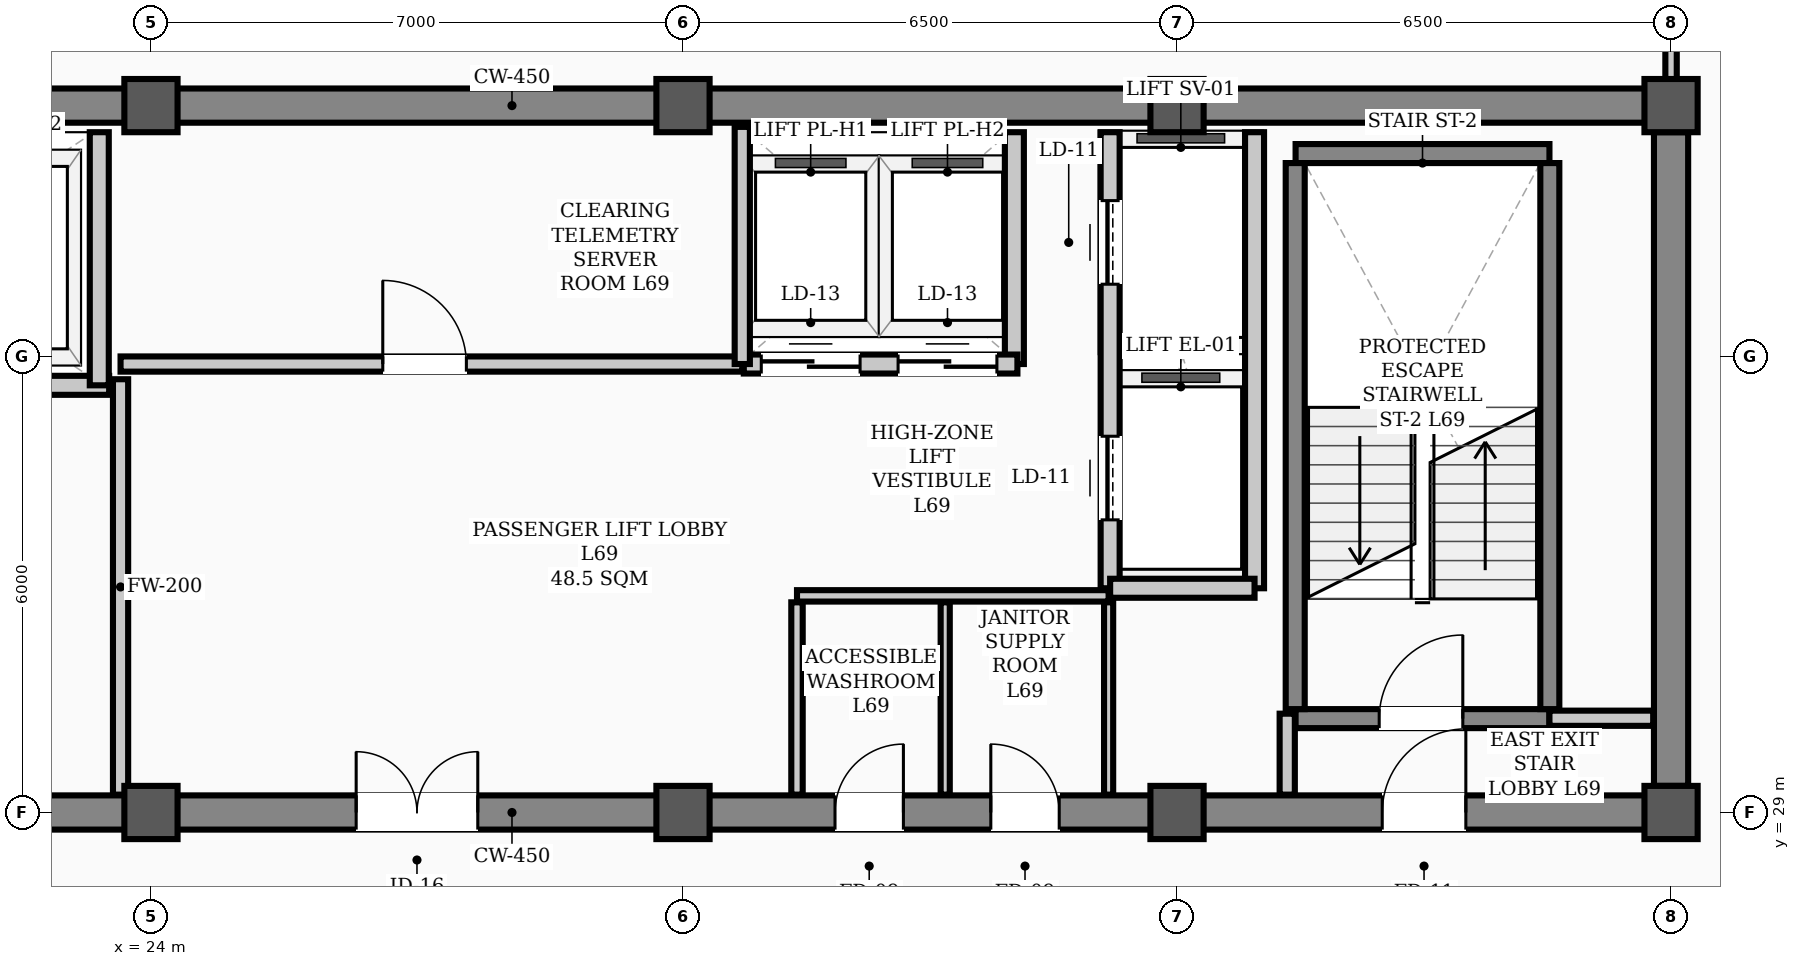
"""IFC4 building model, lengths in metres.
Left out: names, types, materials, properties, quantities, classifications, styles, units other than length and angle.
Written with IfcOpenShell. Run it as: python <this file> out.ifc"""

import sys

from ifc_helpers import new_model, si_unit, direction, frame, frame_2d, origin, origin_2d, place, context, subcontext, project, spatial, rectangle, hollow_rectangle, extrude, element, fill, save


model = new_model("IFC4")
c1 = context("Model", 3, precision=1e-05, world=origin(), true_north=direction((0.0, 1.0)))
c2 = subcontext(c1, "Body", "Model", "MODEL_VIEW")
j1 = project(units=[si_unit("LENGTHUNIT", "METRE"), si_unit("PLANEANGLEUNIT", "RADIAN")], contexts=[c1])
p1 = place(None, origin())
s1 = spatial("IfcSite", under=j1, at=p1, CompositionType="ELEMENT")
p2 = place(p1, origin())
s2 = spatial("IfcBuilding", under=s1, at=p2, CompositionType="ELEMENT")
p3 = place(p2, frame((0.0, 0.0, 277.4)))
s3 = spatial("IfcBuildingStorey", under=s2, at=p3, CompositionType="ELEMENT", Elevation=277.4)
for number, where, z_axis, x_axis in (
    (1, (24.0, 29.0, 0.0), (0.0, 0.0, 1.0), (1.0, 0.0, 0.0)),
    (2, (24.0, 38.3, 0.0), (0.0, 0.0, 1.0), (1.0, 0.0, 0.0)),
    (3, (31.0, 29.0, 0.0), (0.0, 0.0, 1.0), (1.0, 0.0, 0.0)),
    (4, (31.0, 38.3, 0.0), (0.0, 0.0, 1.0), (1.0, 0.0, 0.0)),
    (5, (37.5, 29.0, 0.0), (0.0, 0.0, 1.0), (1.0, 0.0, 0.0)),
    (6, (37.5, 38.3, 0.0), (0.0, 0.0, 1.0), (1.0, 0.0, 0.0)),
    (7, (44.0, 29.0, 0.0), (0.0, 0.0, 1.0), (1.0, 0.0, 0.0)),
    (8, (44.0, 38.3, 0.0), (0.0, 0.0, 1.0), (1.0, 0.0, 0.0)),
):
    element("IfcColumn", number, at=place(p3, frame(where, z_axis=z_axis, x_axis=x_axis)), inside=s3, PredefinedType="COLUMN", context=c2, shape_type="SweptSolid", body=[
        extrude(hollow_rectangle(XDim=0.7, YDim=0.7, WallThickness=0.028, InnerFilletRadius=0.014, OuterFilletRadius=0.042, at=origin_2d()), origin(), (0.0, 0.0, 1.0), 3.9),
    ])
p4 = place(p3, frame((13.5, 29.0, 0.0), z_axis=(0.0, 0.0, 1.0), x_axis=(1.0, 0.0, 0.0)))
e9 = element("IfcWall", 9, at=p4, inside=s3, PredefinedType="SHEAR", context=c2, shape_type="SweptSolid", body=[
    extrude(rectangle(XDim=30.5, YDim=0.45, at=frame_2d((15.25, 0.0))), origin(), (0.0, 0.0, 1.0), 3.66),
])
p5 = place(p4, frame((1.75, 0.0, 0.0)))
e10 = element("IfcOpeningElement", 10, at=p5, cuts=e9, PredefinedType="OPENING", context=c2, shape_type="SweptSolid", body=[
    extrude(rectangle(XDim=1.1, YDim=2.08, at=frame_2d((0.55, 1.04))), frame((0.0, 0.235, 0.0), z_axis=(0.0, -1.0, 0.0), x_axis=(1.0, 0.0, 0.0)), (0.0, 0.0, 1.0), 0.47),
])
p6 = place(p4, frame((26.7, 0.0, 0.0)))
e11 = element("IfcOpeningElement", 11, at=p6, cuts=e9, PredefinedType="OPENING", context=c2, shape_type="SweptSolid", body=[
    extrude(rectangle(XDim=1.1, YDim=2.08, at=frame_2d((0.55, 1.04))), frame((0.0, 0.235, 0.0), z_axis=(0.0, -1.0, 0.0), x_axis=(1.0, 0.0, 0.0)), (0.0, 0.0, 1.0), 0.47),
])
p7 = place(p4, frame((6.8, 0.0, 0.0)))
e12 = element("IfcOpeningElement", 12, at=p7, cuts=e9, PredefinedType="OPENING", context=c2, shape_type="SweptSolid", body=[
    extrude(rectangle(XDim=1.1, YDim=2.08, at=frame_2d((0.55, 1.04))), frame((0.0, 0.235, 0.0), z_axis=(0.0, -1.0, 0.0), x_axis=(1.0, 0.0, 0.0)), (0.0, 0.0, 1.0), 0.47),
])
p8 = place(p4, frame((13.2, 0.0, 0.0)))
e13 = element("IfcOpeningElement", 13, at=p8, cuts=e9, PredefinedType="OPENING", context=c2, shape_type="SweptSolid", body=[
    extrude(rectangle(XDim=1.6, YDim=2.08, at=frame_2d((0.8, 1.04))), frame((0.0, 0.235, 0.0), z_axis=(0.0, -1.0, 0.0), x_axis=(1.0, 0.0, 0.0)), (0.0, 0.0, 1.0), 0.47),
])
p9 = place(p4, frame((19.5, 0.0, 0.0)))
e14 = element("IfcOpeningElement", 14, at=p9, cuts=e9, PredefinedType="OPENING", context=c2, shape_type="SweptSolid", body=[
    extrude(rectangle(XDim=0.9, YDim=2.08, at=frame_2d((0.45, 1.04))), frame((0.0, 0.235, 0.0), z_axis=(0.0, -1.0, 0.0), x_axis=(1.0, 0.0, 0.0)), (0.0, 0.0, 1.0), 0.47),
])
p10 = place(p4, frame((21.55, 0.0, 0.0)))
e15 = element("IfcOpeningElement", 15, at=p10, cuts=e9, PredefinedType="OPENING", context=c2, shape_type="SweptSolid", body=[
    extrude(rectangle(XDim=0.9, YDim=2.08, at=frame_2d((0.45, 1.04))), frame((0.0, 0.235, 0.0), z_axis=(0.0, -1.0, 0.0), x_axis=(1.0, 0.0, 0.0)), (0.0, 0.0, 1.0), 0.47),
])
p11 = place(p3, frame((13.5, 38.3, 0.0), z_axis=(0.0, 0.0, 1.0), x_axis=(1.0, 0.0, 0.0)))
e16 = element("IfcWall", 16, at=p11, inside=s3, PredefinedType="SHEAR", context=c2, shape_type="SweptSolid", body=[
    extrude(rectangle(XDim=30.5, YDim=0.45, at=frame_2d((15.25, 0.0))), origin(), (0.0, 0.0, 1.0), 3.66),
])
p12 = place(p3, frame((44.0, 29.35, 0.0), z_axis=(0.0, 0.0, 1.0), x_axis=(0.0, 1.0, 0.0)))
e17 = element("IfcWall", 17, at=p12, inside=s3, PredefinedType="SHEAR", context=c2, shape_type="SweptSolid", body=[
    extrude(rectangle(XDim=8.6, YDim=0.45, at=frame_2d((4.3, 0.0))), origin(), (0.0, 0.0, 1.0), 3.66),
])
p13 = place(p3, frame((39.06, 30.235, 0.0), z_axis=(0.0, 0.0, 1.0), x_axis=(1.0, 0.0, 0.0)))
e18 = element("IfcWall", 18, at=p13, inside=s3, PredefinedType="STANDARD", context=c2, shape_type="SweptSolid", body=[
    extrude(rectangle(XDim=3.34, YDim=0.25, at=frame_2d((1.67, 0.0))), origin(), (0.0, 0.0, 1.0), 3.66),
])
p14 = place(p13, frame((1.1, 0.0, 0.0)))
e19 = element("IfcOpeningElement", 19, at=p14, cuts=e18, PredefinedType="OPENING", context=c2, shape_type="SweptSolid", body=[
    extrude(rectangle(XDim=1.1, YDim=2.08, at=frame_2d((0.55, 1.04))), frame((0.0, 0.135, 0.0), z_axis=(0.0, -1.0, 0.0), x_axis=(1.0, 0.0, 0.0)), (0.0, 0.0, 1.0), 0.27),
])
p15 = place(p3, frame((39.06, 37.669, 0.0), z_axis=(0.0, 0.0, 1.0), x_axis=(1.0, 0.0, 0.0)))
e20 = element("IfcWall", 20, at=p15, inside=s3, PredefinedType="STANDARD", context=c2, shape_type="SweptSolid", body=[
    extrude(rectangle(XDim=3.34, YDim=0.25, at=frame_2d((1.67, 0.0))), origin(), (0.0, 0.0, 1.0), 3.66),
])
for number, where, z_axis, x_axis in (
    (21, (39.055, 30.36, 0.0), (0.0, 0.0, 1.0), (0.0, 1.0, 0.0)),
    (22, (42.405, 30.36, 0.0), (0.0, 0.0, 1.0), (0.0, 1.0, 0.0)),
):
    element("IfcWall", number, at=place(p3, frame(where, z_axis=z_axis, x_axis=x_axis)), inside=s3, PredefinedType="STANDARD", context=c2, shape_type="SweptSolid", body=[
        extrude(rectangle(XDim=7.184, YDim=0.25, at=frame_2d((3.592, 0.0))), origin(), (0.0, 0.0, 1.0), 3.66),
    ])
p16 = place(p3, frame((18.1, 34.62, 0.0), z_axis=(0.0, 0.0, 1.0), x_axis=(1.0, 0.0, 0.0)))
e23 = element("IfcWall", 23, at=p16, inside=s3, PredefinedType="STANDARD", context=c2, shape_type="SweptSolid", body=[
    extrude(rectangle(XDim=5.35, YDim=0.25, at=frame_2d((2.675, 0.0))), origin(), (0.0, 0.0, 1.0), 3.66),
])
p17 = place(p16, frame((0.85, 0.0, 0.0)))
e24 = element("IfcOpeningElement", 24, at=p17, cuts=e23, PredefinedType="OPENING", context=c2, shape_type="SweptSolid", body=[
    extrude(rectangle(XDim=1.1, YDim=2.08, at=frame_2d((0.55, 1.04))), frame((0.0, 0.135, 0.0), z_axis=(0.0, -1.0, 0.0), x_axis=(1.0, 0.0, 0.0)), (0.0, 0.0, 1.0), 0.27),
])
p18 = place(p16, frame((3.45, 0.0, 0.0)))
e25 = element("IfcOpeningElement", 25, at=p18, cuts=e23, PredefinedType="OPENING", context=c2, shape_type="SweptSolid", body=[
    extrude(rectangle(XDim=1.1, YDim=2.08, at=frame_2d((0.55, 1.04))), frame((0.0, 0.135, 0.0), z_axis=(0.0, -1.0, 0.0), x_axis=(1.0, 0.0, 0.0)), (0.0, 0.0, 1.0), 0.27),
])
p19 = place(p3, frame((36.62, 31.95, 0.0), z_axis=(0.0, 0.0, 1.0), x_axis=(0.0, 1.0, 0.0)))
e26 = element("IfcWall", 26, at=p19, inside=s3, PredefinedType="STANDARD", context=c2, shape_type="SweptSolid", body=[
    extrude(rectangle(XDim=6.0, YDim=0.25, at=frame_2d((3.0, 0.0))), origin(), (0.0, 0.0, 1.0), 2.24),
])
p20 = place(p19, frame((0.9, 0.0, 0.0)))
e27 = element("IfcOpeningElement", 27, at=p20, cuts=e26, PredefinedType="OPENING", context=c2, shape_type="SweptSolid", body=[
    extrude(rectangle(XDim=1.1, YDim=2.08, at=frame_2d((0.55, 1.04))), frame((0.0, 0.135, 0.0), z_axis=(0.0, -1.0, 0.0), x_axis=(1.0, 0.0, 0.0)), (0.0, 0.0, 1.0), 0.27),
])
p21 = place(p19, frame((4.0, 0.0, 0.0)))
e28 = element("IfcOpeningElement", 28, at=p21, cuts=e26, PredefinedType="OPENING", context=c2, shape_type="SweptSolid", body=[
    extrude(rectangle(XDim=1.1, YDim=2.08, at=frame_2d((0.55, 1.04))), frame((0.0, 0.135, 0.0), z_axis=(0.0, -1.0, 0.0), x_axis=(1.0, 0.0, 0.0)), (0.0, 0.0, 1.0), 0.27),
])
p22 = place(p3, frame((38.52, 31.95, 0.0), z_axis=(0.0, 0.0, 1.0), x_axis=(0.0, 1.0, 0.0)))
e29 = element("IfcWall", 29, at=p22, inside=s3, PredefinedType="STANDARD", context=c2, shape_type="SweptSolid", body=[
    extrude(rectangle(XDim=6.0, YDim=0.25, at=frame_2d((3.0, 0.0))), origin(), (0.0, 0.0, 1.0), 2.24),
])
p23 = place(p3, frame((36.62, 31.95, 0.0), z_axis=(0.0, 0.0, 1.0), x_axis=(1.0, 0.0, 0.0)))
e30 = element("IfcWall", 30, at=p23, inside=s3, PredefinedType="STANDARD", context=c2, shape_type="SweptSolid", body=[
    extrude(rectangle(XDim=1.9, YDim=0.25, at=frame_2d((0.95, 0.0))), origin(), (0.0, 0.0, 1.0), 3.48),
])
p24 = place(p3, frame((23.32, 34.62, 0.0), z_axis=(0.0, 0.0, 1.0), x_axis=(0.0, 1.0, 0.0)))
e31 = element("IfcWall", 31, at=p24, inside=s3, PredefinedType="STANDARD", context=c2, shape_type="SweptSolid", body=[
    extrude(rectangle(XDim=3.33, YDim=0.25, at=frame_2d((1.665, 0.0))), origin(), (0.0, 0.0, 1.0), 3.66),
])
p25 = place(p3, frame((35.36, 34.9, 0.0), z_axis=(0.0, 0.0, 1.0), x_axis=(0.0, 1.0, 0.0)))
e32 = element("IfcWall", 32, at=p25, inside=s3, PredefinedType="STANDARD", context=c2, shape_type="SweptSolid", body=[
    extrude(rectangle(XDim=3.05, YDim=0.25, at=frame_2d((1.525, 0.0))), origin(), (0.0, 0.0, 1.0), 2.24),
])
p26 = place(p3, frame((31.8, 34.9, 0.0), z_axis=(0.0, 0.0, 1.0), x_axis=(1.0, 0.0, 0.0)))
e33 = element("IfcWall", 33, at=p26, inside=s3, PredefinedType="STANDARD", context=c2, shape_type="SweptSolid", body=[
    extrude(rectangle(XDim=3.6, YDim=0.25, at=frame_2d((1.8, 0.0))), origin(), (0.0, 0.0, 1.0), 3.66),
])
p27 = place(p26, frame((0.23, 0.0, 0.0)))
e34 = element("IfcOpeningElement", 34, at=p27, cuts=e33, PredefinedType="OPENING", context=c2, shape_type="SweptSolid", body=[
    extrude(rectangle(XDim=1.3, YDim=2.08, at=frame_2d((0.65, 1.04))), frame((0.0, 0.135, 0.0), z_axis=(0.0, -1.0, 0.0), x_axis=(1.0, 0.0, 0.0)), (0.0, 0.0, 1.0), 0.27),
])
p28 = place(p26, frame((2.03, 0.0, 0.0)))
e35 = element("IfcOpeningElement", 35, at=p28, cuts=e33, PredefinedType="OPENING", context=c2, shape_type="SweptSolid", body=[
    extrude(rectangle(XDim=1.3, YDim=2.08, at=frame_2d((0.65, 1.04))), frame((0.0, 0.135, 0.0), z_axis=(0.0, -1.0, 0.0), x_axis=(1.0, 0.0, 0.0)), (0.0, 0.0, 1.0), 0.27),
])
p29 = place(p3, frame((42.4, 30.24, 0.0), z_axis=(0.0, 0.0, 1.0), x_axis=(1.0, 0.0, 0.0)))
e36 = element("IfcWall", 36, at=p29, inside=s3, PredefinedType="STANDARD", context=c2, shape_type="SweptSolid", body=[
    extrude(rectangle(XDim=1.365, YDim=0.2, at=frame_2d((0.683, 0.0))), origin(), (0.0, 0.0, 1.0), 2.24),
])
p30 = place(p3, frame((23.6, 34.9, 0.0), z_axis=(0.0, 0.0, 1.0), x_axis=(1.0, 0.0, 0.0)))
e37 = element("IfcWall", 37, at=p30, inside=s3, PredefinedType="STANDARD", context=c2, shape_type="SweptSolid", body=[
    extrude(rectangle(XDim=8.18, YDim=0.2, at=frame_2d((4.09, 0.0))), origin(), (0.0, 0.0, 1.0), 3.66),
])
p31 = place(p30, frame((3.45, 0.0, 0.0)))
e38 = element("IfcOpeningElement", 38, at=p31, cuts=e37, PredefinedType="OPENING", context=c2, shape_type="SweptSolid", body=[
    extrude(rectangle(XDim=1.1, YDim=2.08, at=frame_2d((0.55, 1.04))), frame((0.0, 0.11, 0.0), z_axis=(0.0, -1.0, 0.0), x_axis=(1.0, 0.0, 0.0)), (0.0, 0.0, 1.0), 0.22),
])
p32 = place(p3, frame((32.5, 31.85, 0.0), z_axis=(0.0, 0.0, 1.0), x_axis=(1.0, 0.0, 0.0)))
e39 = element("IfcWall", 39, at=p32, inside=s3, PredefinedType="PARTITIONING", context=c2, shape_type="SweptSolid", body=[
    extrude(rectangle(XDim=4.1, YDim=0.15, at=frame_2d((2.05, 0.0))), origin(), (0.0, 0.0, 1.0), 3.66),
])
p33 = place(p3, frame((38.95, 29.235, 0.0), z_axis=(0.0, 0.0, 1.0), x_axis=(0.0, 1.0, 0.0)))
e40 = element("IfcWall", 40, at=p33, inside=s3, PredefinedType="STANDARD", context=c2, shape_type="SweptSolid", body=[
    extrude(rectangle(XDim=1.065, YDim=0.2, at=frame_2d((0.532, 0.0))), origin(), (0.0, 0.0, 1.0), 2.24),
])
p34 = place(p3, frame((23.6, 29.235, 0.0), z_axis=(0.0, 0.0, 1.0), x_axis=(0.0, 1.0, 0.0)))
e41 = element("IfcWall", 41, at=p34, inside=s3, PredefinedType="STANDARD", context=c2, shape_type="SweptSolid", body=[
    extrude(rectangle(XDim=5.465, YDim=0.2, at=frame_2d((2.732, 0.0))), origin(), (0.0, 0.0, 1.0), 2.24),
])
p35 = place(p3, frame((32.5, 29.235, 0.0), z_axis=(0.0, 0.0, 1.0), x_axis=(0.0, 1.0, 0.0)))
e42 = element("IfcWall", 42, at=p35, inside=s3, PredefinedType="PARTITIONING", context=c2, shape_type="SweptSolid", body=[
    extrude(rectangle(XDim=2.53, YDim=0.15, at=frame_2d((1.265, 0.0))), origin(), (0.0, 0.0, 1.0), 2.24),
])
for number, where, z_axis, x_axis in (
    (43, (36.6, 29.235, 0.0), (0.0, 0.0, 1.0), (0.0, 1.0, 0.0)),
    (44, (34.45, 29.235, 0.0), (0.0, 0.0, 1.0), (0.0, 1.0, 0.0)),
):
    element("IfcWall", number, at=place(p3, frame(where, z_axis=z_axis, x_axis=x_axis)), inside=s3, PredefinedType="PARTITIONING", context=c2, shape_type="SweptSolid", body=[
        extrude(rectangle(XDim=2.53, YDim=0.12, at=frame_2d((1.265, 0.0))), origin(), (0.0, 0.0, 1.0), 2.24),
    ])
p36 = place(p3, frame((44.0, 38.535, 0.0), z_axis=(0.0, 0.0, 1.0), x_axis=(0.0, 1.0, 0.0)))
e45 = element("IfcWall", 45, at=p36, inside=s3, PredefinedType="PARTITIONING", context=c2, shape_type="SweptSolid", body=[
    extrude(rectangle(XDim=3.205, YDim=0.15, at=frame_2d((1.603, 0.0))), origin(), (0.0, 0.0, 1.0), 2.24),
])
p37 = place(p3, frame((31.78, 34.9, 0.0), z_axis=(0.0, 0.0, 1.0), x_axis=(0.0, 1.0, 0.0)))
e46 = element("IfcWall", 46, at=p37, inside=s3, PredefinedType="STANDARD", context=c2, shape_type="SweptSolid", body=[
    extrude(rectangle(XDim=3.12, YDim=0.2, at=frame_2d((1.56, 0.0))), origin(), (0.0, 0.0, 1.0), 2.24),
])
p38 = place(p14, origin())
e47 = element("IfcDoor", 47, at=p38, inside=s3, OperationType="SINGLE_SWING_RIGHT", PredefinedType="DOOR", context=c2, shape_type="SweptSolid", body=[
    extrude(rectangle(XDim=1.1, YDim=2.08, at=frame_2d((0.55, 1.04))), frame((0.0, 0.025, 0.0), z_axis=(0.0, -1.0, 0.0), x_axis=(1.0, 0.0, 0.0)), (0.0, 0.0, 1.0), 0.05),
])
fill(e19, e47)
p39 = place(p6, origin())
e48 = element("IfcDoor", 48, at=p39, inside=s3, OperationType="SINGLE_SWING_RIGHT", PredefinedType="DOOR", context=c2, shape_type="SweptSolid", body=[
    extrude(rectangle(XDim=1.1, YDim=2.08, at=frame_2d((0.55, 1.04))), frame((0.0, 0.025, 0.0), z_axis=(0.0, -1.0, 0.0), x_axis=(1.0, 0.0, 0.0)), (0.0, 0.0, 1.0), 0.05),
])
fill(e11, e48)
p40 = place(p8, origin())
e49 = element("IfcDoor", 49, at=p40, inside=s3, OperationType="DOUBLE_DOOR_SINGLE_SWING", PredefinedType="DOOR", context=c2, shape_type="SweptSolid", body=[
    extrude(rectangle(XDim=1.6, YDim=2.08, at=frame_2d((0.8, 1.04))), frame((0.0, 0.025, 0.0), z_axis=(0.0, -1.0, 0.0), x_axis=(1.0, 0.0, 0.0)), (0.0, 0.0, 1.0), 0.05),
])
fill(e13, e49)
p41 = place(p31, origin())
e50 = element("IfcDoor", 50, at=p41, inside=s3, OperationType="SINGLE_SWING_LEFT", PredefinedType="DOOR", context=c2, shape_type="SweptSolid", body=[
    extrude(rectangle(XDim=1.1, YDim=2.08, at=frame_2d((0.55, 1.04))), frame((0.0, 0.025, 0.0), z_axis=(0.0, -1.0, 0.0), x_axis=(1.0, 0.0, 0.0)), (0.0, 0.0, 1.0), 0.05),
])
fill(e38, e50)
p42 = place(p9, origin())
e51 = element("IfcDoor", 51, at=p42, inside=s3, OperationType="SINGLE_SWING_RIGHT", PredefinedType="DOOR", context=c2, shape_type="SweptSolid", body=[
    extrude(rectangle(XDim=0.9, YDim=2.08, at=frame_2d((0.45, 1.04))), frame((0.0, 0.025, 0.0), z_axis=(0.0, -1.0, 0.0), x_axis=(1.0, 0.0, 0.0)), (0.0, 0.0, 1.0), 0.05),
])
fill(e14, e51)
p43 = place(p10, origin())
e52 = element("IfcDoor", 52, at=p43, inside=s3, OperationType="SINGLE_SWING_LEFT", PredefinedType="DOOR", context=c2, shape_type="SweptSolid", body=[
    extrude(rectangle(XDim=0.9, YDim=2.08, at=frame_2d((0.45, 1.04))), frame((0.0, 0.025, 0.0), z_axis=(0.0, -1.0, 0.0), x_axis=(1.0, 0.0, 0.0)), (0.0, 0.0, 1.0), 0.05),
])
fill(e15, e52)
p44 = place(p20, origin())
e53 = element("IfcDoor", 53, at=p44, inside=s3, OperationType="SLIDING_TO_LEFT", PredefinedType="DOOR", context=c2, shape_type="SweptSolid", body=[
    extrude(rectangle(XDim=1.1, YDim=2.08, at=frame_2d((0.55, 1.04))), frame((0.0, 0.025, 0.0), z_axis=(0.0, -1.0, 0.0), x_axis=(1.0, 0.0, 0.0)), (0.0, 0.0, 1.0), 0.05),
])
fill(e27, e53)
p45 = place(p21, origin())
e54 = element("IfcDoor", 54, at=p45, inside=s3, OperationType="SLIDING_TO_LEFT", PredefinedType="DOOR", context=c2, shape_type="SweptSolid", body=[
    extrude(rectangle(XDim=1.1, YDim=2.08, at=frame_2d((0.55, 1.04))), frame((0.0, 0.025, 0.0), z_axis=(0.0, -1.0, 0.0), x_axis=(1.0, 0.0, 0.0)), (0.0, 0.0, 1.0), 0.05),
])
fill(e28, e54)
p46 = place(p27, origin())
e55 = element("IfcDoor", 55, at=p46, inside=s3, OperationType="DOUBLE_DOOR_SLIDING", PredefinedType="DOOR", context=c2, shape_type="SweptSolid", body=[
    extrude(rectangle(XDim=1.3, YDim=2.08, at=frame_2d((0.65, 1.04))), frame((0.0, 0.025, 0.0), z_axis=(0.0, -1.0, 0.0), x_axis=(1.0, 0.0, 0.0)), (0.0, 0.0, 1.0), 0.05),
])
fill(e34, e55)
p47 = place(p28, origin())
e56 = element("IfcDoor", 56, at=p47, inside=s3, OperationType="DOUBLE_DOOR_SLIDING", PredefinedType="DOOR", context=c2, shape_type="SweptSolid", body=[
    extrude(rectangle(XDim=1.3, YDim=2.08, at=frame_2d((0.65, 1.04))), frame((0.0, 0.025, 0.0), z_axis=(0.0, -1.0, 0.0), x_axis=(1.0, 0.0, 0.0)), (0.0, 0.0, 1.0), 0.05),
])
fill(e35, e56)
save(model, sys.argv[1])
